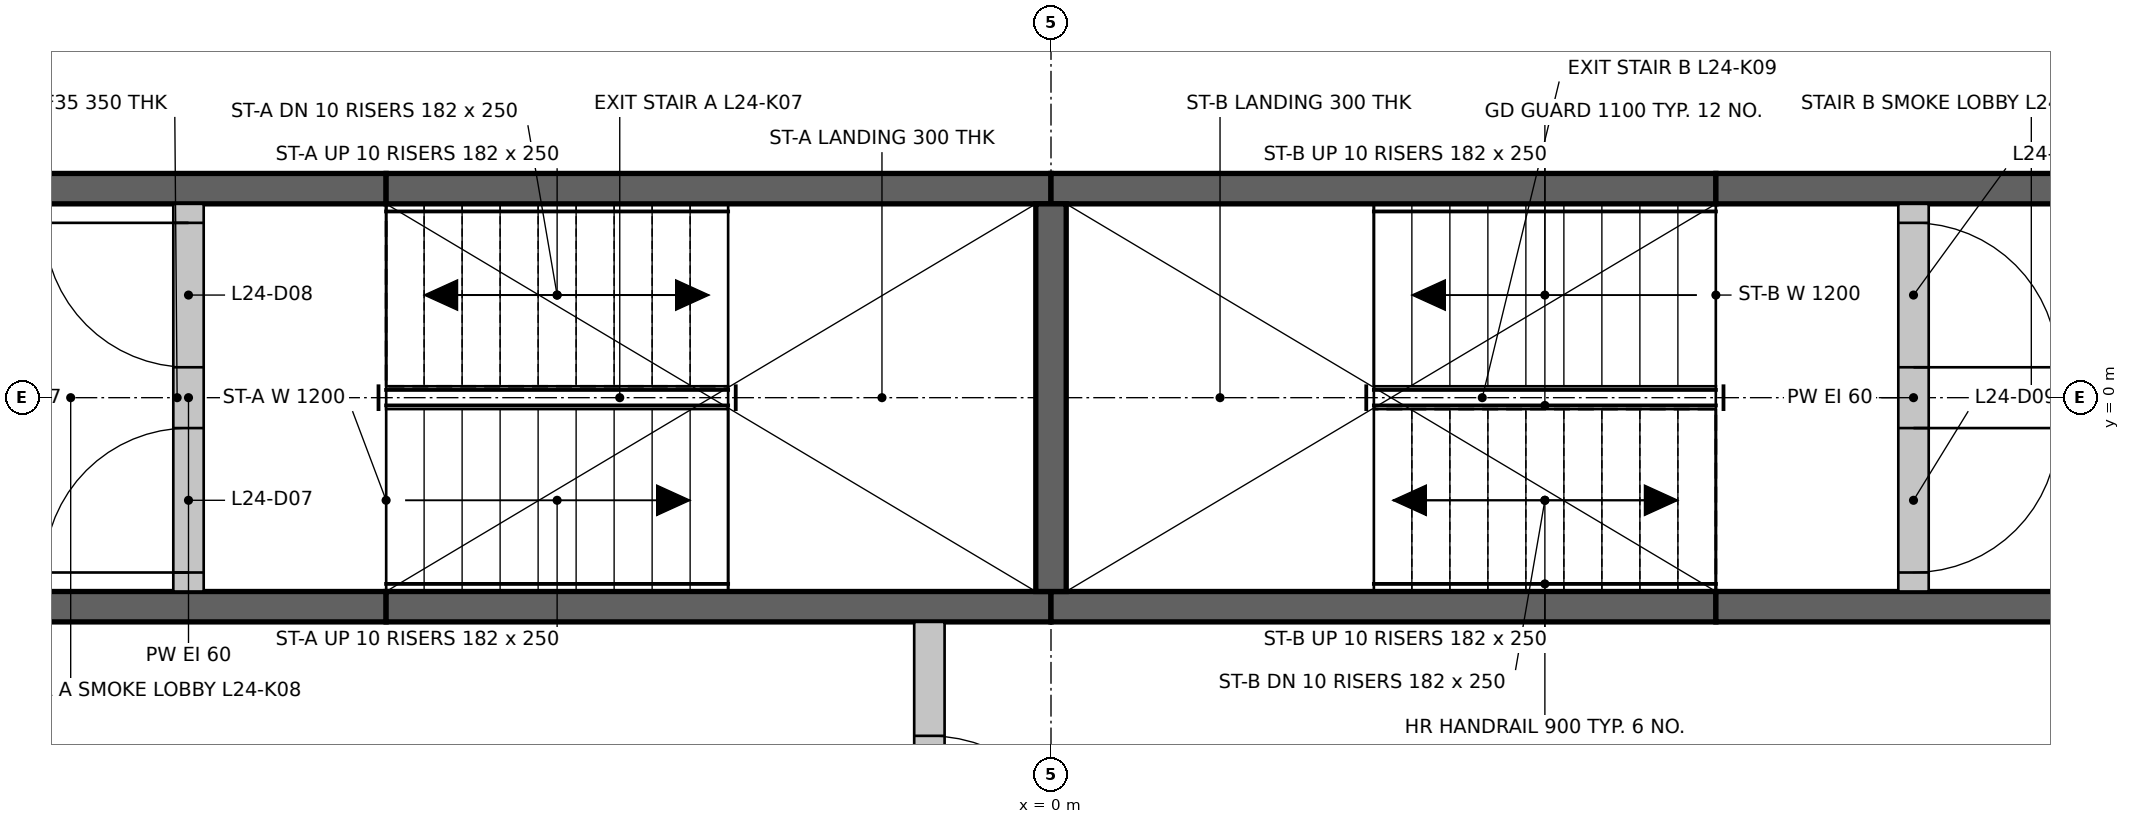
"""IFC4 building model, lengths in metres.
Left out: names, types, materials, properties, quantities, classifications, styles, units other than length and angle.
Written with IfcOpenShell. Run it as: python <this file> out.ifc"""

import sys

from ifc_helpers import new_model, si_unit, direction, frame, frame_2d, origin, place, context, subcontext, project, spatial, rectangle, extrude, element, fill, save


model = new_model("IFC4")
c1 = context("Model", 3, precision=1e-05, world=origin(), true_north=direction((0.0, 1.0)))
c2 = subcontext(c1, "Body", "Model", "MODEL_VIEW")
j1 = project(units=[si_unit("LENGTHUNIT", "METRE"), si_unit("PLANEANGLEUNIT", "RADIAN")], contexts=[c1])
p1 = place(None, origin())
s1 = spatial("IfcSite", under=j1, at=p1, CompositionType="ELEMENT")
p2 = place(p1, origin())
s2 = spatial("IfcBuilding", under=s1, at=p2, CompositionType="ELEMENT")
p3 = place(p2, frame((0.0, 0.0, 101.95)))
s3 = spatial("IfcBuildingStorey", under=s2, at=p3, CompositionType="ELEMENT", Elevation=101.95)
p4 = place(p3, frame((-7.124, -1.375, 0.0), z_axis=(0.0, 0.0, 1.0), x_axis=(1.0, 0.0, 0.0)))
e1 = element("IfcWall", 1, at=p4, inside=s3, PredefinedType="SHEAR", context=c2, shape_type="SweptSolid", body=[
    extrude(rectangle(XDim=2.75, YDim=0.2, at=frame_2d((1.375, 0.0))), origin(), (0.0, 0.0, 1.0), 3.3),
])
for number, where, z_axis, x_axis in (
    (2, (-4.374, -1.375, 0.0), (0.0, 0.0, 1.0), (1.0, 0.0, 0.0)),
    (3, (0.0, -1.375, 0.0), (0.0, 0.0, 1.0), (1.0, 0.0, 0.0)),
):
    element("IfcWall", number, at=place(p3, frame(where, z_axis=z_axis, x_axis=x_axis)), inside=s3, PredefinedType="SHEAR", context=c2, shape_type="SweptSolid", body=[
        extrude(rectangle(XDim=4.374, YDim=0.2, at=frame_2d((2.187, 0.0))), origin(), (0.0, 0.0, 1.0), 3.3),
    ])
for number, where, z_axis, x_axis in (
    (4, (4.374, -1.375, 0.0), (0.0, 0.0, 1.0), (1.0, 0.0, 0.0)),
    (5, (-7.124, 1.375, 0.0), (0.0, 0.0, 1.0), (1.0, 0.0, 0.0)),
):
    element("IfcWall", number, at=place(p3, frame(where, z_axis=z_axis, x_axis=x_axis)), inside=s3, PredefinedType="SHEAR", context=c2, shape_type="SweptSolid", body=[
        extrude(rectangle(XDim=2.75, YDim=0.2, at=frame_2d((1.375, 0.0))), origin(), (0.0, 0.0, 1.0), 3.3),
    ])
for number, where, z_axis, x_axis in (
    (6, (-4.374, 1.375, 0.0), (0.0, 0.0, 1.0), (1.0, 0.0, 0.0)),
    (7, (0.0, 1.375, 0.0), (0.0, 0.0, 1.0), (1.0, 0.0, 0.0)),
):
    element("IfcWall", number, at=place(p3, frame(where, z_axis=z_axis, x_axis=x_axis)), inside=s3, PredefinedType="SHEAR", context=c2, shape_type="SweptSolid", body=[
        extrude(rectangle(XDim=4.374, YDim=0.2, at=frame_2d((2.187, 0.0))), origin(), (0.0, 0.0, 1.0), 3.3),
    ])
p5 = place(p3, frame((4.374, 1.375, 0.0), z_axis=(0.0, 0.0, 1.0), x_axis=(1.0, 0.0, 0.0)))
e8 = element("IfcWall", 8, at=p5, inside=s3, PredefinedType="SHEAR", context=c2, shape_type="SweptSolid", body=[
    extrude(rectangle(XDim=2.75, YDim=0.2, at=frame_2d((1.375, 0.0))), origin(), (0.0, 0.0, 1.0), 3.3),
])
p6 = place(p3, frame((0.0, -1.275, 0.0), z_axis=(0.0, 0.0, 1.0), x_axis=(0.0, 1.0, 0.0)))
e9 = element("IfcWall", 9, at=p6, inside=s3, PredefinedType="SHEAR", context=c2, shape_type="SweptSolid", body=[
    extrude(rectangle(XDim=2.55, YDim=0.2, at=frame_2d((1.275, 0.0))), origin(), (0.0, 0.0, 1.0), 3.3),
])
p7 = place(p3, frame((-0.8, -3.974, 0.0), z_axis=(0.0, 0.0, 1.0), x_axis=(0.0, 1.0, 0.0)))
e10 = element("IfcWall", 10, at=p7, inside=s3, PredefinedType="PARTITIONING", context=c2, shape_type="SweptSolid", body=[
    extrude(rectangle(XDim=2.499, YDim=0.2, at=frame_2d((1.25, 0.0))), origin(), (0.0, 0.0, 1.0), 3.3),
])
p8 = place(p7, frame((0.75, 0.0, 0.0)))
e11 = element("IfcOpeningElement", 11, at=p8, cuts=e10, PredefinedType="OPENING", context=c2, shape_type="SweptSolid", body=[
    extrude(rectangle(XDim=1.0, YDim=2.1, at=frame_2d((0.5, 1.05))), frame((0.0, 0.11, 0.0), z_axis=(0.0, -1.0, 0.0), x_axis=(1.0, 0.0, 0.0)), (0.0, 0.0, 1.0), 0.22),
])
p9 = place(p3, frame((-5.674, -1.275, 0.0), z_axis=(0.0, 0.0, 1.0), x_axis=(0.0, 1.0, 0.0)))
e12 = element("IfcWall", 12, at=p9, inside=s3, PredefinedType="PARTITIONING", context=c2, shape_type="SweptSolid", body=[
    extrude(rectangle(XDim=2.55, YDim=0.2, at=frame_2d((1.275, 0.0))), origin(), (0.0, 0.0, 1.0), 3.3),
])
p10 = place(p9, frame((0.125, 0.0, 0.0)))
e13 = element("IfcOpeningElement", 13, at=p10, cuts=e12, PredefinedType="OPENING", context=c2, shape_type="SweptSolid", body=[
    extrude(rectangle(XDim=0.95, YDim=2.1, at=frame_2d((0.475, 1.05))), frame((0.0, 0.11, 0.0), z_axis=(0.0, -1.0, 0.0), x_axis=(1.0, 0.0, 0.0)), (0.0, 0.0, 1.0), 0.22),
])
p11 = place(p9, frame((1.475, 0.0, 0.0)))
e14 = element("IfcOpeningElement", 14, at=p11, cuts=e12, PredefinedType="OPENING", context=c2, shape_type="SweptSolid", body=[
    extrude(rectangle(XDim=0.95, YDim=2.1, at=frame_2d((0.475, 1.05))), frame((0.0, 0.11, 0.0), z_axis=(0.0, -1.0, 0.0), x_axis=(1.0, 0.0, 0.0)), (0.0, 0.0, 1.0), 0.22),
])
p12 = place(p3, frame((5.674, -1.275, 0.0), z_axis=(0.0, 0.0, 1.0), x_axis=(0.0, 1.0, 0.0)))
e15 = element("IfcWall", 15, at=p12, inside=s3, PredefinedType="PARTITIONING", context=c2, shape_type="SweptSolid", body=[
    extrude(rectangle(XDim=2.55, YDim=0.2, at=frame_2d((1.275, 0.0))), origin(), (0.0, 0.0, 1.0), 3.3),
])
p13 = place(p12, frame((0.125, 0.0, 0.0)))
e16 = element("IfcOpeningElement", 16, at=p13, cuts=e15, PredefinedType="OPENING", context=c2, shape_type="SweptSolid", body=[
    extrude(rectangle(XDim=0.95, YDim=2.1, at=frame_2d((0.475, 1.05))), frame((0.0, 0.11, 0.0), z_axis=(0.0, -1.0, 0.0), x_axis=(1.0, 0.0, 0.0)), (0.0, 0.0, 1.0), 0.22),
])
p14 = place(p12, frame((1.475, 0.0, 0.0)))
e17 = element("IfcOpeningElement", 17, at=p14, cuts=e15, PredefinedType="OPENING", context=c2, shape_type="SweptSolid", body=[
    extrude(rectangle(XDim=0.95, YDim=2.1, at=frame_2d((0.475, 1.05))), frame((0.0, 0.11, 0.0), z_axis=(0.0, -1.0, 0.0), x_axis=(1.0, 0.0, 0.0)), (0.0, 0.0, 1.0), 0.22),
])
p15 = place(p10, origin())
e18 = element("IfcDoor", 18, at=p15, inside=s3, OperationType="SINGLE_SWING_LEFT", PredefinedType="DOOR", context=c2, shape_type="SweptSolid", body=[
    extrude(rectangle(XDim=0.95, YDim=2.1, at=frame_2d((0.475, 1.05))), frame((0.0, 0.025, 0.0), z_axis=(0.0, -1.0, 0.0), x_axis=(1.0, 0.0, 0.0)), (0.0, 0.0, 1.0), 0.05),
])
fill(e13, e18)
p16 = place(p11, origin())
e19 = element("IfcDoor", 19, at=p16, inside=s3, OperationType="SINGLE_SWING_RIGHT", PredefinedType="DOOR", context=c2, shape_type="SweptSolid", body=[
    extrude(rectangle(XDim=0.95, YDim=2.1, at=frame_2d((0.475, 1.05))), frame((0.0, 0.025, 0.0), z_axis=(0.0, -1.0, 0.0), x_axis=(1.0, 0.0, 0.0)), (0.0, 0.0, 1.0), 0.05),
])
fill(e14, e19)
p17 = place(p13, frame((0.95, 0.0, 0.0), z_axis=(0.0, 0.0, 1.0), x_axis=(-1.0, 0.0, 0.0)))
e20 = element("IfcDoor", 20, at=p17, inside=s3, OperationType="SINGLE_SWING_RIGHT", PredefinedType="DOOR", context=c2, shape_type="SweptSolid", body=[
    extrude(rectangle(XDim=0.95, YDim=2.1, at=frame_2d((0.475, 1.05))), frame((0.0, 0.025, 0.0), z_axis=(0.0, -1.0, 0.0), x_axis=(1.0, 0.0, 0.0)), (0.0, 0.0, 1.0), 0.05),
])
fill(e16, e20)
p18 = place(p14, frame((0.95, 0.0, 0.0), z_axis=(0.0, 0.0, 1.0), x_axis=(-1.0, 0.0, 0.0)))
e21 = element("IfcDoor", 21, at=p18, inside=s3, OperationType="SINGLE_SWING_LEFT", PredefinedType="DOOR", context=c2, shape_type="SweptSolid", body=[
    extrude(rectangle(XDim=0.95, YDim=2.1, at=frame_2d((0.475, 1.05))), frame((0.0, 0.025, 0.0), z_axis=(0.0, -1.0, 0.0), x_axis=(1.0, 0.0, 0.0)), (0.0, 0.0, 1.0), 0.05),
])
fill(e17, e21)
p19 = place(p8, frame((1.0, 0.0, 0.0), z_axis=(0.0, 0.0, 1.0), x_axis=(-1.0, 0.0, 0.0)))
e22 = element("IfcDoor", 22, at=p19, inside=s3, OperationType="SINGLE_SWING_LEFT", PredefinedType="DOOR", context=c2, shape_type="SweptSolid", body=[
    extrude(rectangle(XDim=1.0, YDim=2.1, at=frame_2d((0.5, 1.05))), frame((0.0, 0.025, 0.0), z_axis=(0.0, -1.0, 0.0), x_axis=(1.0, 0.0, 0.0)), (0.0, 0.0, 1.0), 0.05),
])
fill(e11, e22)
save(model, sys.argv[1])
